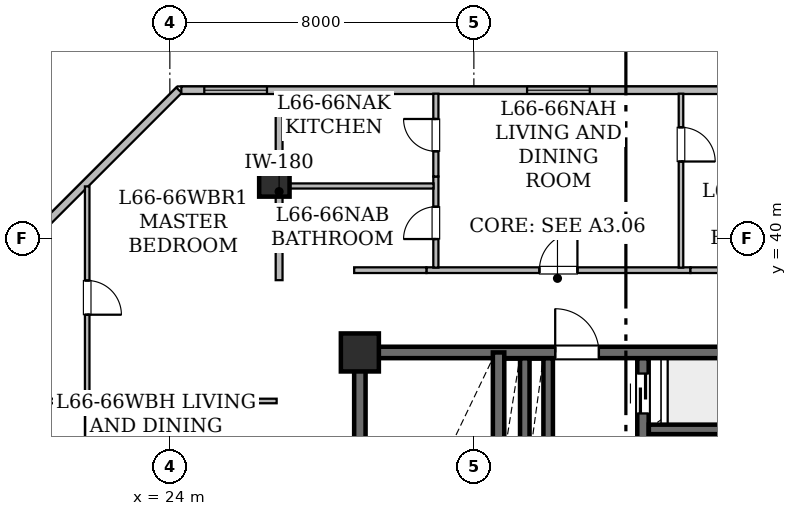
"""IFC4 building model, lengths in metres.
Left out: names, types, materials, properties, quantities, classifications, styles, units other than length and angle.
Written with IfcOpenShell. Run it as: python <this file> out.ifc"""

import sys

from ifc_helpers import new_model, si_unit, direction, frame, frame_2d, origin, origin_2d, place, context, subcontext, project, spatial, rectangle, hollow_rectangle, extrude, element, fill, save


model = new_model("IFC4")
c1 = context("Model", 3, precision=1e-05, world=origin(), true_north=direction((0.0, 1.0)))
c2 = subcontext(c1, "Body", "Model", "MODEL_VIEW")
j1 = project(units=[si_unit("LENGTHUNIT", "METRE"), si_unit("PLANEANGLEUNIT", "RADIAN")], contexts=[c1])
p1 = place(None, origin())
s1 = spatial("IfcSite", under=j1, at=p1, CompositionType="ELEMENT")
p2 = place(p1, origin())
s2 = spatial("IfcBuilding", under=s1, at=p2, CompositionType="ELEMENT")
p3 = place(p2, frame((0.0, 0.0, 257.35)))
s3 = spatial("IfcBuildingStorey", under=s2, at=p3, CompositionType="ELEMENT", Elevation=257.35)
p4 = place(p3, frame((29.0, 37.0, 0.0), z_axis=(0.0, 0.0, 1.0), x_axis=(1.0, 0.0, 0.0)))
e1 = element("IfcColumn", 1, at=p4, inside=s3, PredefinedType="COLUMN", context=c2, shape_type="SweptSolid", body=[
    extrude(hollow_rectangle(XDim=1.0, YDim=1.0, WallThickness=0.05, at=origin_2d()), origin(), (0.0, 0.0, 1.0), 3.65),
])
for number, where, z_axis, x_axis in (
    (2, (26.75, 41.5, 0.0), (0.0, 0.0, 1.0), (1.0, 0.0, 0.0)),
    (3, (22.8, 34.575, 0.0), (0.0, 0.0, 1.0), (1.0, 0.0, 0.0)),
):
    element("IfcColumn", number, at=place(p3, frame(where, z_axis=z_axis, x_axis=x_axis)), inside=s3, PredefinedType="COLUMN", context=c2, shape_type="SweptSolid", body=[
        extrude(hollow_rectangle(XDim=0.8, YDim=0.8, WallThickness=0.04, at=origin_2d()), origin(), (0.0, 0.0, 1.0), 3.65),
    ])
p5 = place(p3, frame((20.344, 40.003, 0.0), z_axis=(0.0, 0.0, 1.0), x_axis=(0.707106781187, 0.707106781187, 0.0)))
e4 = element("IfcWall", 4, at=p5, inside=s3, PredefinedType="STANDARD", context=c2, shape_type="SweptSolid", body=[
    extrude(rectangle(XDim=5.511, YDim=0.2, at=frame_2d((2.756, 0.0))), origin(), (0.0, 0.0, 1.0), 3.43),
])
p6 = place(p3, frame((24.302, 43.9, 0.0), z_axis=(0.0, 0.0, 1.0), x_axis=(1.0, 0.0, 0.0)))
e5 = element("IfcWall", 5, at=p6, inside=s3, PredefinedType="STANDARD", context=c2, shape_type="SweptSolid", body=[
    extrude(rectangle(XDim=41.457, YDim=0.2, at=frame_2d((20.729, 0.0))), origin(), (0.0, 0.0, 1.0), 3.43),
])
p7 = place(p6, frame((0.604, 0.0, 0.85)))
e6 = element("IfcOpeningElement", 6, at=p7, cuts=e5, PredefinedType="OPENING", context=c2, shape_type="SweptSolid", body=[
    extrude(rectangle(XDim=1.65, YDim=1.55, at=frame_2d((0.825, 0.775))), frame((0.0, 0.11, 0.0), z_axis=(0.0, -1.0, 0.0), x_axis=(1.0, 0.0, 0.0)), (0.0, 0.0, 1.0), 0.22),
])
p8 = place(p6, frame((9.098, 0.0, 0.85)))
e7 = element("IfcOpeningElement", 7, at=p8, cuts=e5, PredefinedType="OPENING", context=c2, shape_type="SweptSolid", body=[
    extrude(rectangle(XDim=1.65, YDim=1.55, at=frame_2d((0.825, 0.775))), frame((0.0, 0.11, 0.0), z_axis=(0.0, -1.0, 0.0), x_axis=(1.0, 0.0, 0.0)), (0.0, 0.0, 1.0), 0.22),
])
p9 = place(p6, frame((14.405, 0.0, 0.85)))
e8 = element("IfcOpeningElement", 8, at=p9, cuts=e5, PredefinedType="OPENING", context=c2, shape_type="SweptSolid", body=[
    extrude(rectangle(XDim=1.65, YDim=1.55, at=frame_2d((0.825, 0.775))), frame((0.0, 0.11, 0.0), z_axis=(0.0, -1.0, 0.0), x_axis=(1.0, 0.0, 0.0)), (0.0, 0.0, 1.0), 0.22),
])
p10 = place(p6, frame((22.898, 0.0, 0.8)))
e9 = element("IfcOpeningElement", 9, at=p10, cuts=e5, PredefinedType="OPENING", context=c2, shape_type="SweptSolid", body=[
    extrude(rectangle(XDim=1.2, YDim=1.5, at=frame_2d((0.6, 0.75))), frame((0.0, 0.11, 0.0), z_axis=(0.0, -1.0, 0.0), x_axis=(1.0, 0.0, 0.0)), (0.0, 0.0, 1.0), 0.22),
])
p11 = place(p6, frame((19.188, 0.0, 0.85)))
e10 = element("IfcOpeningElement", 10, at=p11, cuts=e5, PredefinedType="OPENING", context=c2, shape_type="SweptSolid", body=[
    extrude(rectangle(XDim=1.65, YDim=1.55, at=frame_2d((0.825, 0.775))), frame((0.0, 0.11, 0.0), z_axis=(0.0, -1.0, 0.0), x_axis=(1.0, 0.0, 0.0)), (0.0, 0.0, 1.0), 0.22),
])
p12 = place(p6, frame((26.158, 0.0, 0.85)))
e11 = element("IfcOpeningElement", 11, at=p12, cuts=e5, PredefinedType="OPENING", context=c2, shape_type="SweptSolid", body=[
    extrude(rectangle(XDim=1.65, YDim=1.55, at=frame_2d((0.825, 0.775))), frame((0.0, 0.11, 0.0), z_axis=(0.0, -1.0, 0.0), x_axis=(1.0, 0.0, 0.0)), (0.0, 0.0, 1.0), 0.22),
])
p13 = place(p6, frame((32.408, 0.0, 0.85)))
e12 = element("IfcOpeningElement", 12, at=p13, cuts=e5, PredefinedType="OPENING", context=c2, shape_type="SweptSolid", body=[
    extrude(rectangle(XDim=1.65, YDim=1.55, at=frame_2d((0.825, 0.775))), frame((0.0, 0.11, 0.0), z_axis=(0.0, -1.0, 0.0), x_axis=(1.0, 0.0, 0.0)), (0.0, 0.0, 1.0), 0.22),
])
p14 = place(p3, frame((29.0, 28.0, 0.0), z_axis=(0.0, 0.0, 1.0), x_axis=(0.0, 1.0, 0.0)))
e13 = element("IfcWall", 13, at=p14, inside=s3, PredefinedType="SHEAR", context=c2, shape_type="SweptSolid", body=[
    extrude(rectangle(XDim=9.0, YDim=0.3, at=frame_2d((4.5, 0.0))), origin(), (0.0, 0.0, 1.0), 3.43),
])
p15 = place(p3, frame((29.0, 37.0, 0.0), z_axis=(0.0, 0.0, 1.0), x_axis=(1.0, 0.0, 0.0)))
e14 = element("IfcWall", 14, at=p15, inside=s3, PredefinedType="SHEAR", context=c2, shape_type="SweptSolid", body=[
    extrude(rectangle(XDim=10.4, YDim=0.3, at=frame_2d((5.2, 0.0))), origin(), (0.0, 0.0, 1.0), 3.43),
])
p16 = place(p15, frame((5.14, 0.0, 0.0)))
e15 = element("IfcOpeningElement", 15, at=p16, cuts=e14, PredefinedType="OPENING", context=c2, shape_type="SweptSolid", body=[
    extrude(rectangle(XDim=1.15, YDim=2.2, at=frame_2d((0.575, 1.1))), frame((0.0, 0.16, 0.0), z_axis=(0.0, -1.0, 0.0), x_axis=(1.0, 0.0, 0.0)), (0.0, 0.0, 1.0), 0.32),
])
p17 = place(p3, frame((32.65, 28.0, 0.0), z_axis=(0.0, 0.0, 1.0), x_axis=(0.0, 1.0, 0.0)))
e16 = element("IfcWall", 16, at=p17, inside=s3, PredefinedType="SHEAR", context=c2, shape_type="SweptSolid", body=[
    extrude(rectangle(XDim=9.0, YDim=0.3, at=frame_2d((4.5, 0.0))), origin(), (0.0, 0.0, 1.0), 3.43),
])
p18 = place(p17, frame((0.72, 0.0, 0.0)))
e17 = element("IfcOpeningElement", 17, at=p18, cuts=e16, PredefinedType="OPENING", context=c2, shape_type="SweptSolid", body=[
    extrude(rectangle(XDim=1.0, YDim=2.15, at=frame_2d((0.5, 1.075))), frame((0.0, 0.16, 0.0), z_axis=(0.0, -1.0, 0.0), x_axis=(1.0, 0.0, 0.0)), (0.0, 0.0, 1.0), 0.32),
])
p19 = place(p3, frame((36.45, 31.25, 0.0), z_axis=(0.0, 0.0, 1.0), x_axis=(0.0, 1.0, 0.0)))
e18 = element("IfcWall", 18, at=p19, inside=s3, PredefinedType="SHEAR", context=c2, shape_type="SweptSolid", body=[
    extrude(rectangle(XDim=5.596, YDim=0.3, at=frame_2d((2.798, 0.0))), origin(), (0.0, 0.0, 1.0), 3.43),
])
p20 = place(p19, frame((0.12, 0.0, 0.0)))
e19 = element("IfcOpeningElement", 19, at=p20, cuts=e18, PredefinedType="OPENING", context=c2, shape_type="SweptSolid", body=[
    extrude(rectangle(XDim=1.05, YDim=2.15, at=frame_2d((0.525, 1.075))), frame((0.0, 0.16, 0.0), z_axis=(0.0, -1.0, 0.0), x_axis=(1.0, 0.0, 0.0)), (0.0, 0.0, 1.0), 0.32),
])
p21 = place(p19, frame((2.125, 0.0, 0.0)))
e20 = element("IfcOpeningElement", 20, at=p21, cuts=e18, PredefinedType="OPENING", context=c2, shape_type="SweptSolid", body=[
    extrude(rectangle(XDim=1.05, YDim=2.15, at=frame_2d((0.525, 1.075))), frame((0.0, 0.16, 0.0), z_axis=(0.0, -1.0, 0.0), x_axis=(1.0, 0.0, 0.0)), (0.0, 0.0, 1.0), 0.32),
])
p22 = place(p19, frame((4.145, 0.0, 0.0)))
e21 = element("IfcOpeningElement", 21, at=p22, cuts=e18, PredefinedType="OPENING", context=c2, shape_type="SweptSolid", body=[
    extrude(rectangle(XDim=1.05, YDim=2.15, at=frame_2d((0.525, 1.075))), frame((0.0, 0.16, 0.0), z_axis=(0.0, -1.0, 0.0), x_axis=(1.0, 0.0, 0.0)), (0.0, 0.0, 1.0), 0.32),
])
p23 = place(p3, frame((36.604, 34.975, 0.0), z_axis=(0.0, 0.0, 1.0), x_axis=(1.0, 0.0, 0.0)))
e22 = element("IfcWall", 22, at=p23, inside=s3, PredefinedType="SHEAR", context=c2, shape_type="SweptSolid", body=[
    extrude(rectangle(XDim=2.642, YDim=0.25, at=frame_2d((1.321, 0.0))), origin(), (0.0, 0.0, 1.0), 3.43),
])
p24 = place(p3, frame((33.955, 34.025, 0.0), z_axis=(0.0, 0.0, 1.0), x_axis=(0.0, 1.0, 0.0)))
e23 = element("IfcWall", 23, at=p24, inside=s3, PredefinedType="SHEAR", context=c2, shape_type="SweptSolid", body=[
    extrude(rectangle(XDim=2.821, YDim=0.25, at=frame_2d((1.411, 0.0))), origin(), (0.0, 0.0, 1.0), 3.43),
])
p25 = place(p3, frame((33.34, 34.279, 0.0), z_axis=(0.0, 0.0, 1.0), x_axis=(0.0, 1.0, 0.0)))
e24 = element("IfcWall", 24, at=p25, inside=s3, PredefinedType="SHEAR", context=c2, shape_type="SweptSolid", body=[
    extrude(rectangle(XDim=2.567, YDim=0.25, at=frame_2d((1.283, 0.0))), origin(), (0.0, 0.0, 1.0), 3.43),
])
p26 = place(p3, frame((30.751, 39.165, 0.0), z_axis=(0.0, 0.0, 1.0), x_axis=(1.0, 0.0, 0.0)))
e25 = element("IfcWall", 25, at=p26, inside=s3, PredefinedType="STANDARD", context=c2, shape_type="SweptSolid", body=[
    extrude(rectangle(XDim=6.948, YDim=0.15, at=frame_2d((3.474, 0.0))), origin(), (0.0, 0.0, 1.0), 3.43),
])
p27 = place(p26, frame((2.974, 0.0, 0.0)))
e26 = element("IfcOpeningElement", 26, at=p27, cuts=e25, PredefinedType="OPENING", context=c2, shape_type="SweptSolid", body=[
    extrude(rectangle(XDim=1.0, YDim=2.15, at=frame_2d((0.5, 1.075))), frame((0.0, 0.085, 0.0), z_axis=(0.0, -1.0, 0.0), x_axis=(1.0, 0.0, 0.0)), (0.0, 0.0, 1.0), 0.17),
])
p28 = place(p3, frame((28.85, 39.165, 0.0), z_axis=(0.0, 0.0, 1.0), x_axis=(1.0, 0.0, 0.0)))
e27 = element("IfcWall", 27, at=p28, inside=s3, PredefinedType="STANDARD", context=c2, shape_type="SweptSolid", body=[
    extrude(rectangle(XDim=1.901, YDim=0.15, at=frame_2d((0.95, 0.0))), origin(), (0.0, 0.0, 1.0), 3.43),
])
p29 = place(p3, frame((37.699, 39.165, 0.0), z_axis=(0.0, 0.0, 1.0), x_axis=(1.0, 0.0, 0.0)))
e28 = element("IfcWall", 28, at=p29, inside=s3, PredefinedType="STANDARD", context=c2, shape_type="SweptSolid", body=[
    extrude(rectangle(XDim=3.851, YDim=0.15, at=frame_2d((1.926, 0.0))), origin(), (0.0, 0.0, 1.0), 2.725),
])
p30 = place(p3, frame((21.825, 41.369, 0.0), z_axis=(0.0, 0.0, 1.0), x_axis=(0.0, -1.0, 0.0)))
e29 = element("IfcWall", 29, at=p30, inside=s3, PredefinedType="PARTITIONING", context=c2, shape_type="SweptSolid", body=[
    extrude(rectangle(XDim=8.311, YDim=0.12, at=frame_2d((4.155, 0.0))), origin(), (0.0, 0.0, 1.0), 2.687),
])
p31 = place(p30, frame((2.476, 0.0, 0.0)))
e30 = element("IfcOpeningElement", 30, at=p31, cuts=e29, PredefinedType="OPENING", context=c2, shape_type="SweptSolid", body=[
    extrude(rectangle(XDim=0.9, YDim=2.1, at=frame_2d((0.45, 1.05))), frame((0.0, 0.07, 0.0), z_axis=(0.0, -1.0, 0.0), x_axis=(1.0, 0.0, 0.0)), (0.0, 0.0, 1.0), 0.14),
])
p32 = place(p3, frame((20.392, 35.723, 0.0), z_axis=(0.0, 0.0, 1.0), x_axis=(1.0, 0.0, 0.0)))
e31 = element("IfcWall", 31, at=p32, inside=s3, PredefinedType="PARTITIONING", context=c2, shape_type="SweptSolid", body=[
    extrude(rectangle(XDim=6.418, YDim=0.12, at=frame_2d((3.209, 0.0))), origin(), (0.0, 0.0, 1.0), 2.725),
])
p33 = place(p3, frame((26.875, 41.643, 0.0), z_axis=(0.0, 0.0, 1.0), x_axis=(0.0, -1.0, 0.0)))
e32 = element("IfcWall", 32, at=p33, inside=s3, PredefinedType="STANDARD", context=c2, shape_type="SweptSolid", body=[
    extrude(rectangle(XDim=2.741, YDim=0.18, at=frame_2d((1.371, 0.0))), origin(), (0.0, 0.0, 1.0), 2.725),
])
p34 = place(p3, frame((26.875, 43.808, 0.0), z_axis=(0.0, 0.0, 1.0), x_axis=(0.0, -1.0, 0.0)))
e33 = element("IfcWall", 33, at=p34, inside=s3, PredefinedType="STANDARD", context=c2, shape_type="SweptSolid", body=[
    extrude(rectangle(XDim=2.165, YDim=0.18, at=frame_2d((1.083, 0.0))), origin(), (0.0, 0.0, 1.0), 2.725),
])
p35 = place(p3, frame((31.0, 39.232, 0.0), z_axis=(0.0, 0.0, 1.0), x_axis=(0.0, 1.0, 0.0)))
e34 = element("IfcWall", 34, at=p35, inside=s3, PredefinedType="PARTITIONING", context=c2, shape_type="SweptSolid", body=[
    extrude(rectangle(XDim=2.397, YDim=0.135, at=frame_2d((1.198, 0.0))), origin(), (0.0, 0.0, 1.0), 2.887),
])
p36 = place(p35, frame((0.752, 0.0, 0.0)))
e35 = element("IfcOpeningElement", 35, at=p36, cuts=e34, PredefinedType="OPENING", context=c2, shape_type="SweptSolid", body=[
    extrude(rectangle(XDim=0.85, YDim=2.1, at=frame_2d((0.425, 1.05))), frame((0.0, 0.077, 0.0), z_axis=(0.0, -1.0, 0.0), x_axis=(1.0, 0.0, 0.0)), (0.0, 0.0, 1.0), 0.155),
])
p37 = place(p3, frame((31.0, 41.629, 0.0), z_axis=(0.0, 0.0, 1.0), x_axis=(0.0, 1.0, 0.0)))
e36 = element("IfcWall", 36, at=p37, inside=s3, PredefinedType="PARTITIONING", context=c2, shape_type="SweptSolid", body=[
    extrude(rectangle(XDim=2.179, YDim=0.135, at=frame_2d((1.09, 0.0))), origin(), (0.0, 0.0, 1.0), 3.43),
])
p38 = place(p37, frame((0.664, 0.0, 0.0)))
e37 = element("IfcOpeningElement", 37, at=p38, cuts=e36, PredefinedType="OPENING", context=c2, shape_type="SweptSolid", body=[
    extrude(rectangle(XDim=0.85, YDim=2.1, at=frame_2d((0.425, 1.05))), frame((0.0, 0.077, 0.0), z_axis=(0.0, -1.0, 0.0), x_axis=(1.0, 0.0, 0.0)), (0.0, 0.0, 1.0), 0.155),
])
p39 = place(p3, frame((37.45, 43.808, 0.0), z_axis=(0.0, 0.0, 1.0), x_axis=(0.0, -1.0, 0.0)))
e38 = element("IfcWall", 38, at=p39, inside=s3, PredefinedType="PARTITIONING", context=c2, shape_type="SweptSolid", body=[
    extrude(rectangle(XDim=4.576, YDim=0.12, at=frame_2d((2.288, 0.0))), origin(), (0.0, 0.0, 1.0), 2.887),
])
p40 = place(p39, frame((0.884, 0.0, 0.0)))
e39 = element("IfcOpeningElement", 39, at=p40, cuts=e38, PredefinedType="OPENING", context=c2, shape_type="SweptSolid", body=[
    extrude(rectangle(XDim=0.9, YDim=2.1, at=frame_2d((0.45, 1.05))), frame((0.0, 0.07, 0.0), z_axis=(0.0, -1.0, 0.0), x_axis=(1.0, 0.0, 0.0)), (0.0, 0.0, 1.0), 0.14),
])
p41 = place(p3, frame((26.957, 41.38, 0.0), z_axis=(0.0, 0.0, 1.0), x_axis=(1.0, 0.0, 0.0)))
e40 = element("IfcWall", 40, at=p41, inside=s3, PredefinedType="PARTITIONING", context=c2, shape_type="SweptSolid", body=[
    extrude(rectangle(XDim=3.982, YDim=0.135, at=frame_2d((1.991, 0.0))), origin(), (0.0, 0.0, 1.0), 2.725),
])
p42 = place(p7, origin())
e41 = element("IfcWindow", 41, at=p42, inside=s3, PartitioningType="SINGLE_PANEL", PredefinedType="WINDOW", context=c2, shape_type="SweptSolid", body=[
    extrude(rectangle(XDim=1.65, YDim=1.55, at=frame_2d((0.825, 0.775))), frame((0.0, 0.03, 0.0), z_axis=(0.0, -1.0, 0.0), x_axis=(1.0, 0.0, 0.0)), (0.0, 0.0, 1.0), 0.06),
])
fill(e6, e41)
p43 = place(p8, origin())
e42 = element("IfcWindow", 42, at=p43, inside=s3, PartitioningType="SINGLE_PANEL", PredefinedType="WINDOW", context=c2, shape_type="SweptSolid", body=[
    extrude(rectangle(XDim=1.65, YDim=1.55, at=frame_2d((0.825, 0.775))), frame((0.0, 0.03, 0.0), z_axis=(0.0, -1.0, 0.0), x_axis=(1.0, 0.0, 0.0)), (0.0, 0.0, 1.0), 0.06),
])
fill(e7, e42)
p44 = place(p16, origin())
e43 = element("IfcDoor", 43, at=p44, inside=s3, OperationType="SINGLE_SWING_LEFT", PredefinedType="DOOR", context=c2, shape_type="SweptSolid", body=[
    extrude(rectangle(XDim=1.15, YDim=2.2, at=frame_2d((0.575, 1.1))), frame((0.0, 0.025, 0.0), z_axis=(0.0, -1.0, 0.0), x_axis=(1.0, 0.0, 0.0)), (0.0, 0.0, 1.0), 0.05),
])
fill(e15, e43)
p45 = place(p22, origin())
e44 = element("IfcDoor", 44, at=p45, inside=s3, OperationType="SLIDING_TO_LEFT", PredefinedType="DOOR", context=c2, shape_type="SweptSolid", body=[
    extrude(rectangle(XDim=1.05, YDim=2.15, at=frame_2d((0.525, 1.075))), frame((0.0, 0.025, 0.0), z_axis=(0.0, -1.0, 0.0), x_axis=(1.0, 0.0, 0.0)), (0.0, 0.0, 1.0), 0.05),
])
fill(e21, e44)
p46 = place(p27, origin())
e45 = element("IfcDoor", 45, at=p46, inside=s3, OperationType="SINGLE_SWING_RIGHT", PredefinedType="DOOR", context=c2, shape_type="SweptSolid", body=[
    extrude(rectangle(XDim=1.0, YDim=2.15, at=frame_2d((0.5, 1.075))), frame((0.0, 0.025, 0.0), z_axis=(0.0, -1.0, 0.0), x_axis=(1.0, 0.0, 0.0)), (0.0, 0.0, 1.0), 0.05),
])
fill(e26, e45)
p47 = place(p31, origin())
e46 = element("IfcDoor", 46, at=p47, inside=s3, OperationType="SINGLE_SWING_RIGHT", PredefinedType="DOOR", context=c2, shape_type="SweptSolid", body=[
    extrude(rectangle(XDim=0.9, YDim=2.1, at=frame_2d((0.45, 1.05))), frame((0.0, 0.025, 0.0), z_axis=(0.0, -1.0, 0.0), x_axis=(1.0, 0.0, 0.0)), (0.0, 0.0, 1.0), 0.05),
])
fill(e30, e46)
p48 = place(p36, origin())
e47 = element("IfcDoor", 47, at=p48, inside=s3, OperationType="SINGLE_SWING_LEFT", PredefinedType="DOOR", context=c2, shape_type="SweptSolid", body=[
    extrude(rectangle(XDim=0.85, YDim=2.1, at=frame_2d((0.425, 1.05))), frame((0.0, 0.025, 0.0), z_axis=(0.0, -1.0, 0.0), x_axis=(1.0, 0.0, 0.0)), (0.0, 0.0, 1.0), 0.05),
])
fill(e35, e47)
p49 = place(p38, origin())
e48 = element("IfcDoor", 48, at=p49, inside=s3, OperationType="SINGLE_SWING_RIGHT", PredefinedType="DOOR", context=c2, shape_type="SweptSolid", body=[
    extrude(rectangle(XDim=0.85, YDim=2.1, at=frame_2d((0.425, 1.05))), frame((0.0, 0.025, 0.0), z_axis=(0.0, -1.0, 0.0), x_axis=(1.0, 0.0, 0.0)), (0.0, 0.0, 1.0), 0.05),
])
fill(e37, e48)
p50 = place(p40, origin())
e49 = element("IfcDoor", 49, at=p50, inside=s3, OperationType="SINGLE_SWING_RIGHT", PredefinedType="DOOR", context=c2, shape_type="SweptSolid", body=[
    extrude(rectangle(XDim=0.9, YDim=2.1, at=frame_2d((0.45, 1.05))), frame((0.0, 0.025, 0.0), z_axis=(0.0, -1.0, 0.0), x_axis=(1.0, 0.0, 0.0)), (0.0, 0.0, 1.0), 0.05),
])
fill(e39, e49)
save(model, sys.argv[1])
